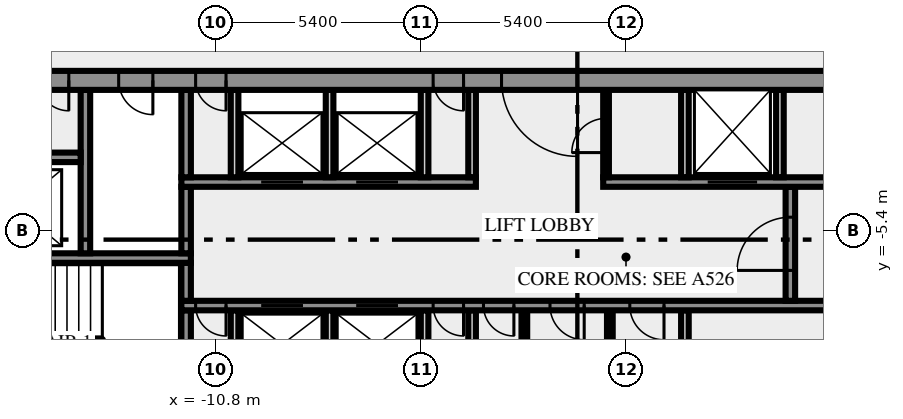
"""IFC4 building model, lengths in metres.
Left out: names, types, materials, properties, quantities, classifications, styles, units other than length and angle.
Written with IfcOpenShell. Run it as: python <this file> out.ifc"""

import sys

from ifc_helpers import new_model, si_unit, direction, frame, frame_2d, origin, place, context, subcontext, project, spatial, rectangle, extrude, element, fill, save


model = new_model("IFC4")
c1 = context("Model", 3, precision=1e-05, world=origin(), true_north=direction((0.0, 1.0)))
c2 = subcontext(c1, "Body", "Model", "MODEL_VIEW")
j1 = project(units=[si_unit("LENGTHUNIT", "METRE"), si_unit("PLANEANGLEUNIT", "RADIAN")], contexts=[c1])
p1 = place(None, origin())
s1 = spatial("IfcSite", under=j1, at=p1, CompositionType="ELEMENT")
p2 = place(p1, origin())
s2 = spatial("IfcBuilding", under=s1, at=p2, CompositionType="ELEMENT")
p3 = place(p2, frame((0.0, 0.0, 343.0)))
s3 = spatial("IfcBuildingStorey", under=s2, at=p3, CompositionType="ELEMENT", Elevation=343.0)
p4 = place(p3, frame((-11.575, -10.5, 0.0), z_axis=(0.0, 0.0, 1.0), x_axis=(0.0, 1.0, 0.0)))
e1 = element("IfcWall", 1, at=p4, inside=s3, PredefinedType="SHEAR", context=c2, shape_type="SweptSolid", body=[
    extrude(rectangle(XDim=3.0, YDim=0.25, at=frame_2d((1.5, 0.0))), origin(), (0.0, 0.0, 1.0), 3.65),
])
for number, where, z_axis, x_axis in (
    (2, (-10.3, -10.5, 0.0), (0.0, 0.0, 1.0), (0.0, 1.0, 0.0)),
    (3, (-7.8, -10.5, 0.0), (0.0, 0.0, 1.0), (0.0, 1.0, 0.0)),
    (4, (-5.3, -10.5, 0.0), (0.0, 0.0, 1.0), (0.0, 1.0, 0.0)),
    (5, (-4.05, -10.5, 0.0), (0.0, 0.0, 1.0), (0.0, 1.0, 0.0)),
):
    element("IfcWall", number, at=place(p3, frame(where, z_axis=z_axis, x_axis=x_axis)), inside=s3, PredefinedType="SOLIDWALL", context=c2, shape_type="SweptSolid", body=[
        extrude(rectangle(XDim=3.0, YDim=0.2, at=frame_2d((1.5, 0.0))), origin(), (0.0, 0.0, 1.0), 3.65),
    ])
for number, where, z_axis, x_axis in (
    (6, (-2.675, -10.5, 0.0), (0.0, 0.0, 1.0), (0.0, 1.0, 0.0)),
    (7, (-0.425, -10.5, 0.0), (0.0, 0.0, 1.0), (0.0, 1.0, 0.0)),
):
    element("IfcWall", number, at=place(p3, frame(where, z_axis=z_axis, x_axis=x_axis)), inside=s3, PredefinedType="PARTITIONING", context=c2, shape_type="SweptSolid", body=[
        extrude(rectangle(XDim=3.0, YDim=0.15, at=frame_2d((1.5, 0.0))), origin(), (0.0, 0.0, 1.0), 3.65),
    ])
p5 = place(p3, frame((1.55, -10.5, 0.0), z_axis=(0.0, 0.0, 1.0), x_axis=(0.0, 1.0, 0.0)))
e8 = element("IfcWall", 8, at=p5, inside=s3, PredefinedType="SOLIDWALL", context=c2, shape_type="SweptSolid", body=[
    extrude(rectangle(XDim=3.0, YDim=0.2, at=frame_2d((1.5, 0.0))), origin(), (0.0, 0.0, 1.0), 3.65),
])
p6 = place(p3, frame((11.7, -7.375, 0.0), z_axis=(0.0, 0.0, 1.0), x_axis=(-1.0, 0.0, 0.0)))
e9 = element("IfcWall", 9, at=p6, inside=s3, PredefinedType="SHEAR", context=c2, shape_type="SweptSolid", body=[
    extrude(rectangle(XDim=23.4, YDim=0.25, at=frame_2d((11.7, 0.0))), origin(), (0.0, 0.0, 1.0), 3.65),
])
p7 = place(p6, frame((22.225, 0.0, 0.0)))
e10 = element("IfcOpeningElement", 10, at=p7, cuts=e9, PredefinedType="OPENING", context=c2, shape_type="SweptSolid", body=[
    extrude(rectangle(XDim=0.8, YDim=2.1, at=frame_2d((0.4, 1.05))), frame((0.0, 0.135, 0.0), z_axis=(0.0, -1.0, 0.0), x_axis=(1.0, 0.0, 0.0)), (0.0, 0.0, 1.0), 0.27),
])
p8 = place(p6, frame((20.2, 0.0, 0.0)))
e11 = element("IfcOpeningElement", 11, at=p8, cuts=e9, PredefinedType="OPENING", context=c2, shape_type="SweptSolid", body=[
    extrude(rectangle(XDim=1.1, YDim=2.1, at=frame_2d((0.55, 1.05))), frame((0.0, 0.135, 0.0), z_axis=(0.0, -1.0, 0.0), x_axis=(1.0, 0.0, 0.0)), (0.0, 0.0, 1.0), 0.27),
])
p9 = place(p6, frame((17.7, 0.0, 0.0)))
e12 = element("IfcOpeningElement", 12, at=p9, cuts=e9, PredefinedType="OPENING", context=c2, shape_type="SweptSolid", body=[
    extrude(rectangle(XDim=1.1, YDim=2.1, at=frame_2d((0.55, 1.05))), frame((0.0, 0.135, 0.0), z_axis=(0.0, -1.0, 0.0), x_axis=(1.0, 0.0, 0.0)), (0.0, 0.0, 1.0), 0.27),
])
p10 = place(p6, frame((15.975, 0.0, 0.0)))
e13 = element("IfcOpeningElement", 13, at=p10, cuts=e9, PredefinedType="OPENING", context=c2, shape_type="SweptSolid", body=[
    extrude(rectangle(XDim=0.8, YDim=2.1, at=frame_2d((0.4, 1.05))), frame((0.0, 0.135, 0.0), z_axis=(0.0, -1.0, 0.0), x_axis=(1.0, 0.0, 0.0)), (0.0, 0.0, 1.0), 0.27),
])
p11 = place(p6, frame((14.65, 0.0, 0.0)))
e14 = element("IfcOpeningElement", 14, at=p11, cuts=e9, PredefinedType="OPENING", context=c2, shape_type="SweptSolid", body=[
    extrude(rectangle(XDim=0.8, YDim=2.1, at=frame_2d((0.4, 1.05))), frame((0.0, 0.135, 0.0), z_axis=(0.0, -1.0, 0.0), x_axis=(1.0, 0.0, 0.0)), (0.0, 0.0, 1.0), 0.27),
])
p12 = place(p6, frame((12.8, 0.0, 0.0)))
e15 = element("IfcOpeningElement", 15, at=p12, cuts=e9, PredefinedType="OPENING", context=c2, shape_type="SweptSolid", body=[
    extrude(rectangle(XDim=0.9, YDim=2.1, at=frame_2d((0.45, 1.05))), frame((0.0, 0.135, 0.0), z_axis=(0.0, -1.0, 0.0), x_axis=(1.0, 0.0, 0.0)), (0.0, 0.0, 1.0), 0.27),
])
p13 = place(p6, frame((10.7, 0.0, 0.0)))
e16 = element("IfcOpeningElement", 16, at=p13, cuts=e9, PredefinedType="OPENING", context=c2, shape_type="SweptSolid", body=[
    extrude(rectangle(XDim=0.9, YDim=2.1, at=frame_2d((0.45, 1.05))), frame((0.0, 0.135, 0.0), z_axis=(0.0, -1.0, 0.0), x_axis=(1.0, 0.0, 0.0)), (0.0, 0.0, 1.0), 0.27),
])
p14 = place(p6, frame((4.7, 0.0, 0.0)))
e17 = element("IfcOpeningElement", 17, at=p14, cuts=e9, PredefinedType="OPENING", context=c2, shape_type="SweptSolid", body=[
    extrude(rectangle(XDim=0.9, YDim=2.1, at=frame_2d((0.45, 1.05))), frame((0.0, 0.135, 0.0), z_axis=(0.0, -1.0, 0.0), x_axis=(1.0, 0.0, 0.0)), (0.0, 0.0, 1.0), 0.27),
])
p15 = place(p3, frame((-11.575, -7.25, 0.0), z_axis=(0.0, 0.0, 1.0), x_axis=(0.0, 1.0, 0.0)))
e18 = element("IfcWall", 18, at=p15, inside=s3, PredefinedType="SHEAR", context=c2, shape_type="SweptSolid", body=[
    extrude(rectangle(XDim=1.0, YDim=0.25, at=frame_2d((0.5, 0.0))), origin(), (0.0, 0.0, 1.0), 3.65),
])
p16 = place(p3, frame((4.325, -7.25, 0.0), z_axis=(0.0, 0.0, 1.0), x_axis=(0.0, 1.0, 0.0)))
e19 = element("IfcWall", 19, at=p16, inside=s3, PredefinedType="SHEAR", context=c2, shape_type="SweptSolid", body=[
    extrude(rectangle(XDim=3.0, YDim=0.25, at=frame_2d((1.5, 0.0))), origin(), (0.0, 0.0, 1.0), 3.65),
])
p17 = place(p16, frame((0.8, 0.0, 0.0)))
e20 = element("IfcOpeningElement", 20, at=p17, cuts=e19, PredefinedType="OPENING", context=c2, shape_type="SweptSolid", body=[
    extrude(rectangle(XDim=1.4, YDim=2.1, at=frame_2d((0.7, 1.05))), frame((0.0, 0.135, 0.0), z_axis=(0.0, -1.0, 0.0), x_axis=(1.0, 0.0, 0.0)), (0.0, 0.0, 1.0), 0.27),
])
p18 = place(p3, frame((-11.45, -6.125, 0.0), z_axis=(0.0, 0.0, 1.0), x_axis=(-1.0, 0.0, 0.0)))
e21 = element("IfcWall", 21, at=p18, inside=s3, PredefinedType="SHEAR", context=c2, shape_type="SweptSolid", body=[
    extrude(rectangle(XDim=8.05, YDim=0.25, at=frame_2d((4.025, 0.0))), origin(), (0.0, 0.0, 1.0), 3.65),
])
p19 = place(p18, frame((6.2, 0.0, 0.0)))
e22 = element("IfcOpeningElement", 22, at=p19, cuts=e21, PredefinedType="OPENING", context=c2, shape_type="SweptSolid", body=[
    extrude(rectangle(XDim=1.8, YDim=2.1, at=frame_2d((0.9, 1.05))), frame((0.0, 0.135, 0.0), z_axis=(0.0, -1.0, 0.0), x_axis=(1.0, 0.0, 0.0)), (0.0, 0.0, 1.0), 0.27),
])
p20 = place(p3, frame((-14.225, -6.0, 0.0), z_axis=(0.0, 0.0, 1.0), x_axis=(0.0, 1.0, 0.0)))
e23 = element("IfcWall", 23, at=p20, inside=s3, PredefinedType="SHEAR", context=c2, shape_type="SweptSolid", body=[
    extrude(rectangle(XDim=4.3, YDim=0.25, at=frame_2d((2.15, 0.0))), origin(), (0.0, 0.0, 1.0), 3.65),
])
p21 = place(p3, frame((-11.575, -6.0, 0.0), z_axis=(0.0, 0.0, 1.0), x_axis=(0.0, 1.0, 0.0)))
e24 = element("IfcWall", 24, at=p21, inside=s3, PredefinedType="SHEAR", context=c2, shape_type="SweptSolid", body=[
    extrude(rectangle(XDim=1.75, YDim=0.25, at=frame_2d((0.875, 0.0))), origin(), (0.0, 0.0, 1.0), 3.65),
])
p22 = place(p3, frame((-11.7, -4.125, 0.0), z_axis=(0.0, 0.0, 1.0), x_axis=(1.0, 0.0, 0.0)))
e25 = element("IfcWall", 25, at=p22, inside=s3, PredefinedType="SHEAR", context=c2, shape_type="SweptSolid", body=[
    extrude(rectangle(XDim=7.75, YDim=0.25, at=frame_2d((3.875, 0.0))), origin(), (0.0, 0.0, 1.0), 3.65),
])
p23 = place(p22, frame((2.1, 0.0, 0.0)))
e26 = element("IfcOpeningElement", 26, at=p23, cuts=e25, PredefinedType="OPENING", context=c2, shape_type="SweptSolid", body=[
    extrude(rectangle(XDim=1.1, YDim=2.1, at=frame_2d((0.55, 1.05))), frame((0.0, 0.135, 0.0), z_axis=(0.0, -1.0, 0.0), x_axis=(1.0, 0.0, 0.0)), (0.0, 0.0, 1.0), 0.27),
])
p24 = place(p22, frame((4.6, 0.0, 0.0)))
e27 = element("IfcOpeningElement", 27, at=p24, cuts=e25, PredefinedType="OPENING", context=c2, shape_type="SweptSolid", body=[
    extrude(rectangle(XDim=1.1, YDim=2.1, at=frame_2d((0.55, 1.05))), frame((0.0, 0.135, 0.0), z_axis=(0.0, -1.0, 0.0), x_axis=(1.0, 0.0, 0.0)), (0.0, 0.0, 1.0), 0.27),
])
p25 = place(p3, frame((-0.6, -4.125, 0.0), z_axis=(0.0, 0.0, 1.0), x_axis=(1.0, 0.0, 0.0)))
e28 = element("IfcWall", 28, at=p25, inside=s3, PredefinedType="SHEAR", context=c2, shape_type="SweptSolid", body=[
    extrude(rectangle(XDim=12.3, YDim=0.25, at=frame_2d((6.15, 0.0))), origin(), (0.0, 0.0, 1.0), 3.65),
])
p26 = place(p25, frame((2.75, 0.0, 0.0)))
e29 = element("IfcOpeningElement", 29, at=p26, cuts=e28, PredefinedType="OPENING", context=c2, shape_type="SweptSolid", body=[
    extrude(rectangle(XDim=1.3, YDim=2.1, at=frame_2d((0.65, 1.05))), frame((0.0, 0.135, 0.0), z_axis=(0.0, -1.0, 0.0), x_axis=(1.0, 0.0, 0.0)), (0.0, 0.0, 1.0), 0.27),
])
p27 = place(p3, frame((-11.575, -4.0, 0.0), z_axis=(0.0, 0.0, 1.0), x_axis=(0.0, 1.0, 0.0)))
e30 = element("IfcWall", 30, at=p27, inside=s3, PredefinedType="SHEAR", context=c2, shape_type="SweptSolid", body=[
    extrude(rectangle(XDim=2.3, YDim=0.25, at=frame_2d((1.15, 0.0))), origin(), (0.0, 0.0, 1.0), 3.65),
])
for number, where, z_axis, x_axis in (
    (31, (-10.3, -4.0, 0.0), (0.0, 0.0, 1.0), (0.0, 1.0, 0.0)),
    (32, (-7.8, -4.0, 0.0), (0.0, 0.0, 1.0), (0.0, 1.0, 0.0)),
    (33, (-5.3, -4.0, 0.0), (0.0, 0.0, 1.0), (0.0, 1.0, 0.0)),
    (34, (-4.05, -4.0, 0.0), (0.0, 0.0, 1.0), (0.0, 1.0, 0.0)),
):
    element("IfcWall", number, at=place(p3, frame(where, z_axis=z_axis, x_axis=x_axis)), inside=s3, PredefinedType="SOLIDWALL", context=c2, shape_type="SweptSolid", body=[
        extrude(rectangle(XDim=2.3, YDim=0.2, at=frame_2d((1.15, 0.0))), origin(), (0.0, 0.0, 1.0), 3.65),
    ])
p28 = place(p3, frame((-0.525, -4.0, 0.0), z_axis=(0.0, 0.0, 1.0), x_axis=(0.0, 1.0, 0.0)))
e35 = element("IfcWall", 35, at=p28, inside=s3, PredefinedType="PARTITIONING", context=c2, shape_type="SweptSolid", body=[
    extrude(rectangle(XDim=2.3, YDim=0.15, at=frame_2d((1.15, 0.0))), origin(), (0.0, 0.0, 1.0), 3.65),
])
p29 = place(p28, frame((0.65, 0.0, 0.0)))
e36 = element("IfcOpeningElement", 36, at=p29, cuts=e35, PredefinedType="OPENING", context=c2, shape_type="SweptSolid", body=[
    extrude(rectangle(XDim=0.9, YDim=2.1, at=frame_2d((0.45, 1.05))), frame((0.0, 0.085, 0.0), z_axis=(0.0, -1.0, 0.0), x_axis=(1.0, 0.0, 0.0)), (0.0, 0.0, 1.0), 0.17),
])
for number, where, z_axis, x_axis in (
    (37, (1.55, -4.0, 0.0), (0.0, 0.0, 1.0), (0.0, 1.0, 0.0)),
    (38, (4.05, -4.0, 0.0), (0.0, 0.0, 1.0), (0.0, 1.0, 0.0)),
):
    element("IfcWall", number, at=place(p3, frame(where, z_axis=z_axis, x_axis=x_axis)), inside=s3, PredefinedType="SOLIDWALL", context=c2, shape_type="SweptSolid", body=[
        extrude(rectangle(XDim=2.3, YDim=0.2, at=frame_2d((1.15, 0.0))), origin(), (0.0, 0.0, 1.0), 3.65),
    ])
p30 = place(p3, frame((-17.35, -3.475, 0.0), z_axis=(0.0, 0.0, 1.0), x_axis=(1.0, 0.0, 0.0)))
e39 = element("IfcWall", 39, at=p30, inside=s3, PredefinedType="SHEAR", context=c2, shape_type="SweptSolid", body=[
    extrude(rectangle(XDim=3.0, YDim=0.25, at=frame_2d((1.5, 0.0))), origin(), (0.0, 0.0, 1.0), 3.65),
])
p31 = place(p3, frame((20.49, -1.45, 0.0), z_axis=(0.0, 0.0, 1.0), x_axis=(-1.0, 0.0, 0.0)))
e40 = element("IfcWall", 40, at=p31, inside=s3, PredefinedType="SHEAR", context=c2, shape_type="SweptSolid", body=[
    extrude(rectangle(XDim=40.98, YDim=0.5, at=frame_2d((20.49, 0.0))), origin(), (0.0, 0.0, 1.0), 3.65),
])
p32 = place(p31, frame((38.14, 0.0, 0.0)))
e41 = element("IfcOpeningElement", 41, at=p32, cuts=e40, PredefinedType="OPENING", context=c2, shape_type="SweptSolid", body=[
    extrude(rectangle(XDim=1.8, YDim=2.1, at=frame_2d((0.9, 1.05))), frame((0.0, 0.26, 0.0), z_axis=(0.0, -1.0, 0.0), x_axis=(1.0, 0.0, 0.0)), (0.0, 0.0, 1.0), 0.52),
])
p33 = place(p31, frame((36.728, 0.0, 0.0)))
e42 = element("IfcOpeningElement", 42, at=p33, cuts=e40, PredefinedType="OPENING", context=c2, shape_type="SweptSolid", body=[
    extrude(rectangle(XDim=0.8, YDim=2.1, at=frame_2d((0.4, 1.05))), frame((0.0, 0.26, 0.0), z_axis=(0.0, -1.0, 0.0), x_axis=(1.0, 0.0, 0.0)), (0.0, 0.0, 1.0), 0.52),
])
p34 = place(p31, frame((35.153, 0.0, 0.0)))
e43 = element("IfcOpeningElement", 43, at=p34, cuts=e40, PredefinedType="OPENING", context=c2, shape_type="SweptSolid", body=[
    extrude(rectangle(XDim=0.8, YDim=2.1, at=frame_2d((0.4, 1.05))), frame((0.0, 0.26, 0.0), z_axis=(0.0, -1.0, 0.0), x_axis=(1.0, 0.0, 0.0)), (0.0, 0.0, 1.0), 0.52),
])
p35 = place(p31, frame((32.94, 0.0, 0.0)))
e44 = element("IfcOpeningElement", 44, at=p35, cuts=e40, PredefinedType="OPENING", context=c2, shape_type="SweptSolid", body=[
    extrude(rectangle(XDim=0.9, YDim=2.1, at=frame_2d((0.45, 1.05))), frame((0.0, 0.26, 0.0), z_axis=(0.0, -1.0, 0.0), x_axis=(1.0, 0.0, 0.0)), (0.0, 0.0, 1.0), 0.52),
])
p36 = place(p31, frame((31.015, 0.0, 0.0)))
e45 = element("IfcOpeningElement", 45, at=p36, cuts=e40, PredefinedType="OPENING", context=c2, shape_type="SweptSolid", body=[
    extrude(rectangle(XDim=0.8, YDim=2.1, at=frame_2d((0.4, 1.05))), frame((0.0, 0.26, 0.0), z_axis=(0.0, -1.0, 0.0), x_axis=(1.0, 0.0, 0.0)), (0.0, 0.0, 1.0), 0.52),
])
p37 = place(p31, frame((24.765, 0.0, 0.0)))
e46 = element("IfcOpeningElement", 46, at=p37, cuts=e40, PredefinedType="OPENING", context=c2, shape_type="SweptSolid", body=[
    extrude(rectangle(XDim=0.8, YDim=2.1, at=frame_2d((0.4, 1.05))), frame((0.0, 0.26, 0.0), z_axis=(0.0, -1.0, 0.0), x_axis=(1.0, 0.0, 0.0)), (0.0, 0.0, 1.0), 0.52),
])
p38 = place(p31, frame((21.765, 0.0, 0.0)))
e47 = element("IfcOpeningElement", 47, at=p38, cuts=e40, PredefinedType="OPENING", context=c2, shape_type="SweptSolid", body=[
    extrude(rectangle(XDim=2.0, YDim=2.1, at=frame_2d((1.0, 1.05))), frame((0.0, 0.26, 0.0), z_axis=(0.0, -1.0, 0.0), x_axis=(1.0, 0.0, 0.0)), (0.0, 0.0, 1.0), 0.52),
])
p39 = place(p31, frame((14.002, 0.0, 0.0)))
e48 = element("IfcOpeningElement", 48, at=p39, cuts=e40, PredefinedType="OPENING", context=c2, shape_type="SweptSolid", body=[
    extrude(rectangle(XDim=0.9, YDim=2.1, at=frame_2d((0.45, 1.05))), frame((0.0, 0.26, 0.0), z_axis=(0.0, -1.0, 0.0), x_axis=(1.0, 0.0, 0.0)), (0.0, 0.0, 1.0), 0.52),
])
p40 = place(p31, frame((10.278, 0.0, 0.0)))
e49 = element("IfcOpeningElement", 49, at=p40, cuts=e40, PredefinedType="OPENING", context=c2, shape_type="SweptSolid", body=[
    extrude(rectangle(XDim=0.9, YDim=2.1, at=frame_2d((0.45, 1.05))), frame((0.0, 0.26, 0.0), z_axis=(0.0, -1.0, 0.0), x_axis=(1.0, 0.0, 0.0)), (0.0, 0.0, 1.0), 0.52),
])
p41 = place(p31, frame((7.14, 0.0, 0.0)))
e50 = element("IfcOpeningElement", 50, at=p41, cuts=e40, PredefinedType="OPENING", context=c2, shape_type="SweptSolid", body=[
    extrude(rectangle(XDim=0.9, YDim=2.1, at=frame_2d((0.45, 1.05))), frame((0.0, 0.26, 0.0), z_axis=(0.0, -1.0, 0.0), x_axis=(1.0, 0.0, 0.0)), (0.0, 0.0, 1.0), 0.52),
])
p42 = place(p31, frame((4.19, 0.0, 0.0)))
e51 = element("IfcOpeningElement", 51, at=p42, cuts=e40, PredefinedType="OPENING", context=c2, shape_type="SweptSolid", body=[
    extrude(rectangle(XDim=0.9, YDim=2.1, at=frame_2d((0.45, 1.05))), frame((0.0, 0.26, 0.0), z_axis=(0.0, -1.0, 0.0), x_axis=(1.0, 0.0, 0.0)), (0.0, 0.0, 1.0), 0.52),
])
p43 = place(p31, frame((1.04, 0.0, 0.0)))
e52 = element("IfcOpeningElement", 52, at=p43, cuts=e40, PredefinedType="OPENING", context=c2, shape_type="SweptSolid", body=[
    extrude(rectangle(XDim=1.8, YDim=2.1, at=frame_2d((0.9, 1.05))), frame((0.0, 0.26, 0.0), z_axis=(0.0, -1.0, 0.0), x_axis=(1.0, 0.0, 0.0)), (0.0, 0.0, 1.0), 0.52),
])
p44 = place(p7, origin())
e53 = element("IfcDoor", 53, at=p44, inside=s3, OperationType="SINGLE_SWING_RIGHT", PredefinedType="DOOR", context=c2, shape_type="SweptSolid", body=[
    extrude(rectangle(XDim=0.8, YDim=2.1, at=frame_2d((0.4, 1.05))), frame((0.0, 0.025, 0.0), z_axis=(0.0, -1.0, 0.0), x_axis=(1.0, 0.0, 0.0)), (0.0, 0.0, 1.0), 0.05),
])
fill(e10, e53)
p45 = place(p8, origin())
e54 = element("IfcDoor", 54, at=p45, inside=s3, OperationType="DOUBLE_DOOR_SLIDING", PredefinedType="DOOR", context=c2, shape_type="SweptSolid", body=[
    extrude(rectangle(XDim=1.1, YDim=2.1, at=frame_2d((0.55, 1.05))), frame((0.0, 0.025, 0.0), z_axis=(0.0, -1.0, 0.0), x_axis=(1.0, 0.0, 0.0)), (0.0, 0.0, 1.0), 0.05),
])
fill(e11, e54)
p46 = place(p9, origin())
e55 = element("IfcDoor", 55, at=p46, inside=s3, OperationType="DOUBLE_DOOR_SLIDING", PredefinedType="DOOR", context=c2, shape_type="SweptSolid", body=[
    extrude(rectangle(XDim=1.1, YDim=2.1, at=frame_2d((0.55, 1.05))), frame((0.0, 0.025, 0.0), z_axis=(0.0, -1.0, 0.0), x_axis=(1.0, 0.0, 0.0)), (0.0, 0.0, 1.0), 0.05),
])
fill(e12, e55)
p47 = place(p10, origin())
e56 = element("IfcDoor", 56, at=p47, inside=s3, OperationType="SINGLE_SWING_RIGHT", PredefinedType="DOOR", context=c2, shape_type="SweptSolid", body=[
    extrude(rectangle(XDim=0.8, YDim=2.1, at=frame_2d((0.4, 1.05))), frame((0.0, 0.025, 0.0), z_axis=(0.0, -1.0, 0.0), x_axis=(1.0, 0.0, 0.0)), (0.0, 0.0, 1.0), 0.05),
])
fill(e13, e56)
p48 = place(p11, origin())
e57 = element("IfcDoor", 57, at=p48, inside=s3, OperationType="SINGLE_SWING_RIGHT", PredefinedType="DOOR", context=c2, shape_type="SweptSolid", body=[
    extrude(rectangle(XDim=0.8, YDim=2.1, at=frame_2d((0.4, 1.05))), frame((0.0, 0.025, 0.0), z_axis=(0.0, -1.0, 0.0), x_axis=(1.0, 0.0, 0.0)), (0.0, 0.0, 1.0), 0.05),
])
fill(e14, e57)
p49 = place(p12, origin())
e58 = element("IfcDoor", 58, at=p49, inside=s3, OperationType="SINGLE_SWING_RIGHT", PredefinedType="DOOR", context=c2, shape_type="SweptSolid", body=[
    extrude(rectangle(XDim=0.9, YDim=2.1, at=frame_2d((0.45, 1.05))), frame((0.0, 0.025, 0.0), z_axis=(0.0, -1.0, 0.0), x_axis=(1.0, 0.0, 0.0)), (0.0, 0.0, 1.0), 0.05),
])
fill(e15, e58)
p50 = place(p13, origin())
e59 = element("IfcDoor", 59, at=p50, inside=s3, OperationType="SINGLE_SWING_LEFT", PredefinedType="DOOR", context=c2, shape_type="SweptSolid", body=[
    extrude(rectangle(XDim=0.9, YDim=2.1, at=frame_2d((0.45, 1.05))), frame((0.0, 0.025, 0.0), z_axis=(0.0, -1.0, 0.0), x_axis=(1.0, 0.0, 0.0)), (0.0, 0.0, 1.0), 0.05),
])
fill(e16, e59)
p51 = place(p17, origin())
e60 = element("IfcDoor", 60, at=p51, inside=s3, OperationType="DOUBLE_DOOR_SINGLE_SWING", PredefinedType="DOOR", context=c2, shape_type="SweptSolid", body=[
    extrude(rectangle(XDim=1.4, YDim=2.1, at=frame_2d((0.7, 1.05))), frame((0.0, 0.025, 0.0), z_axis=(0.0, -1.0, 0.0), x_axis=(1.0, 0.0, 0.0)), (0.0, 0.0, 1.0), 0.05),
])
fill(e20, e60)
p52 = place(p23, origin())
e61 = element("IfcDoor", 61, at=p52, inside=s3, OperationType="DOUBLE_DOOR_SLIDING", PredefinedType="DOOR", context=c2, shape_type="SweptSolid", body=[
    extrude(rectangle(XDim=1.1, YDim=2.1, at=frame_2d((0.55, 1.05))), frame((0.0, 0.025, 0.0), z_axis=(0.0, -1.0, 0.0), x_axis=(1.0, 0.0, 0.0)), (0.0, 0.0, 1.0), 0.05),
])
fill(e26, e61)
p53 = place(p24, origin())
e62 = element("IfcDoor", 62, at=p53, inside=s3, OperationType="DOUBLE_DOOR_SLIDING", PredefinedType="DOOR", context=c2, shape_type="SweptSolid", body=[
    extrude(rectangle(XDim=1.1, YDim=2.1, at=frame_2d((0.55, 1.05))), frame((0.0, 0.025, 0.0), z_axis=(0.0, -1.0, 0.0), x_axis=(1.0, 0.0, 0.0)), (0.0, 0.0, 1.0), 0.05),
])
fill(e27, e62)
p54 = place(p26, origin())
e63 = element("IfcDoor", 63, at=p54, inside=s3, OperationType="DOUBLE_DOOR_SLIDING", PredefinedType="DOOR", context=c2, shape_type="SweptSolid", body=[
    extrude(rectangle(XDim=1.3, YDim=2.1, at=frame_2d((0.65, 1.05))), frame((0.0, 0.025, 0.0), z_axis=(0.0, -1.0, 0.0), x_axis=(1.0, 0.0, 0.0)), (0.0, 0.0, 1.0), 0.05),
])
fill(e29, e63)
p55 = place(p29, origin())
e64 = element("IfcDoor", 64, at=p55, inside=s3, OperationType="SINGLE_SWING_LEFT", PredefinedType="DOOR", context=c2, shape_type="SweptSolid", body=[
    extrude(rectangle(XDim=0.9, YDim=2.1, at=frame_2d((0.45, 1.05))), frame((0.0, 0.025, 0.0), z_axis=(0.0, -1.0, 0.0), x_axis=(1.0, 0.0, 0.0)), (0.0, 0.0, 1.0), 0.05),
])
fill(e36, e64)
p56 = place(p34, origin())
e65 = element("IfcDoor", 65, at=p56, inside=s3, OperationType="SINGLE_SWING_RIGHT", PredefinedType="DOOR", context=c2, shape_type="SweptSolid", body=[
    extrude(rectangle(XDim=0.8, YDim=2.1, at=frame_2d((0.4, 1.05))), frame((0.0, 0.025, 0.0), z_axis=(0.0, -1.0, 0.0), x_axis=(1.0, 0.0, 0.0)), (0.0, 0.0, 1.0), 0.05),
])
fill(e43, e65)
p57 = place(p35, origin())
e66 = element("IfcDoor", 66, at=p57, inside=s3, OperationType="SINGLE_SWING_RIGHT", PredefinedType="DOOR", context=c2, shape_type="SweptSolid", body=[
    extrude(rectangle(XDim=0.9, YDim=2.1, at=frame_2d((0.45, 1.05))), frame((0.0, 0.025, 0.0), z_axis=(0.0, -1.0, 0.0), x_axis=(1.0, 0.0, 0.0)), (0.0, 0.0, 1.0), 0.05),
])
fill(e44, e66)
p58 = place(p36, origin())
e67 = element("IfcDoor", 67, at=p58, inside=s3, OperationType="SINGLE_SWING_RIGHT", PredefinedType="DOOR", context=c2, shape_type="SweptSolid", body=[
    extrude(rectangle(XDim=0.8, YDim=2.1, at=frame_2d((0.4, 1.05))), frame((0.0, 0.025, 0.0), z_axis=(0.0, -1.0, 0.0), x_axis=(1.0, 0.0, 0.0)), (0.0, 0.0, 1.0), 0.05),
])
fill(e45, e67)
p59 = place(p37, origin())
e68 = element("IfcDoor", 68, at=p59, inside=s3, OperationType="SINGLE_SWING_RIGHT", PredefinedType="DOOR", context=c2, shape_type="SweptSolid", body=[
    extrude(rectangle(XDim=0.8, YDim=2.1, at=frame_2d((0.4, 1.05))), frame((0.0, 0.025, 0.0), z_axis=(0.0, -1.0, 0.0), x_axis=(1.0, 0.0, 0.0)), (0.0, 0.0, 1.0), 0.05),
])
fill(e46, e68)
p60 = place(p38, origin())
e69 = element("IfcDoor", 69, at=p60, inside=s3, OperationType="DOUBLE_DOOR_SINGLE_SWING", PredefinedType="DOOR", context=c2, shape_type="SweptSolid", body=[
    extrude(rectangle(XDim=2.0, YDim=2.1, at=frame_2d((1.0, 1.05))), frame((0.0, 0.025, 0.0), z_axis=(0.0, -1.0, 0.0), x_axis=(1.0, 0.0, 0.0)), (0.0, 0.0, 1.0), 0.05),
])
fill(e47, e69)
save(model, sys.argv[1])
